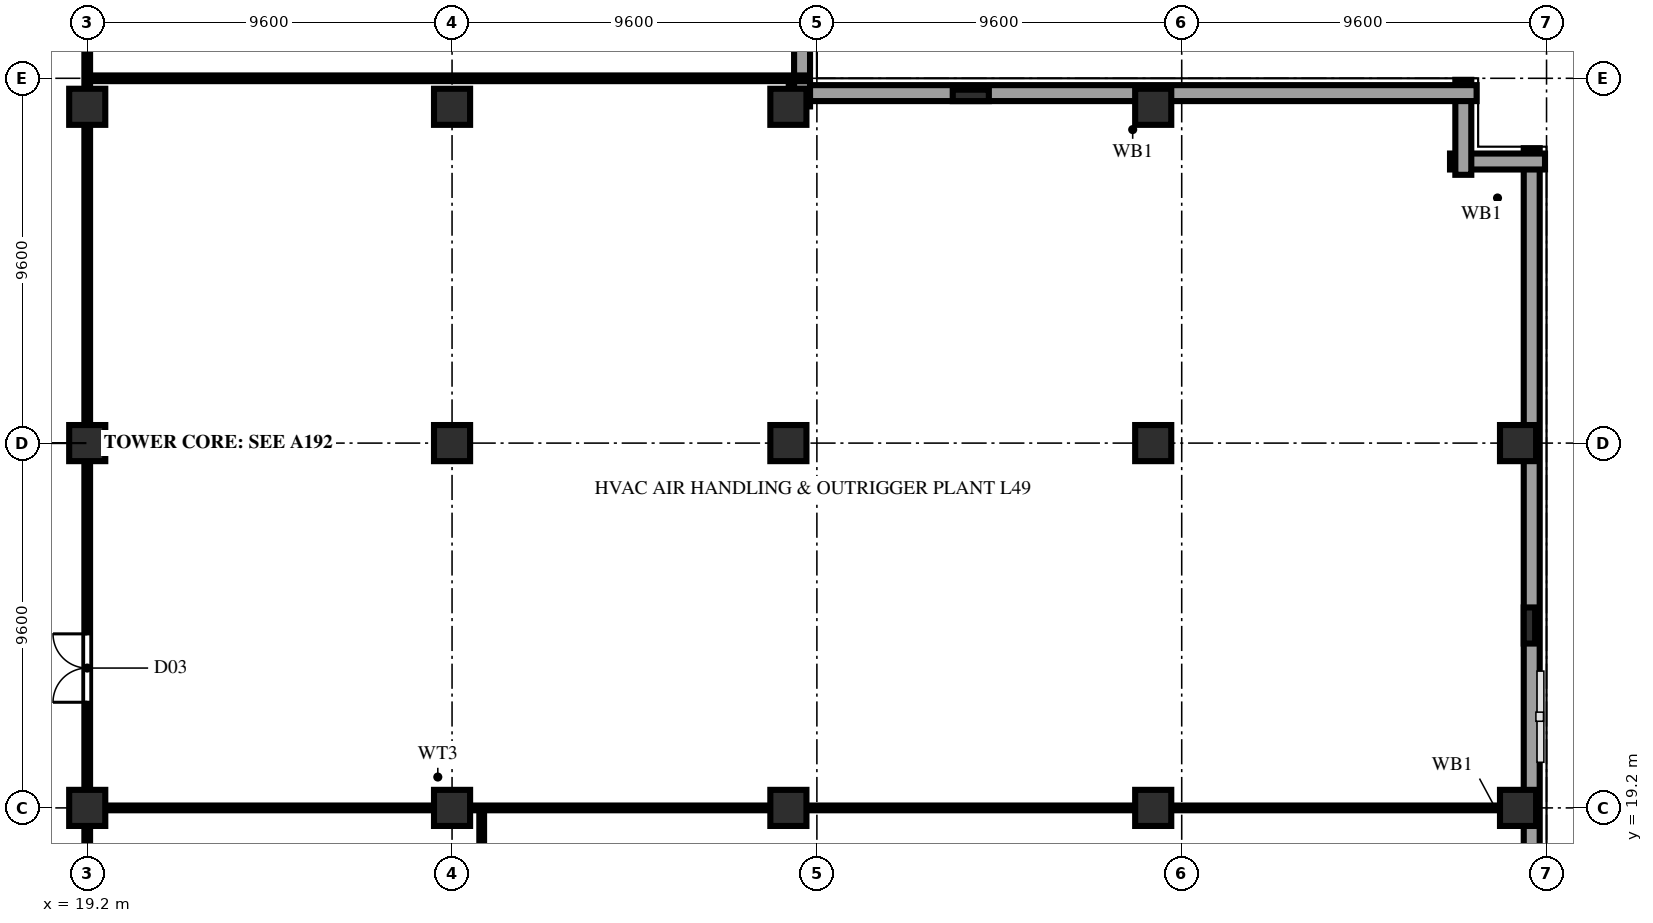
"""IFC4 building model, lengths in metres.
Left out: names, types, materials, properties, quantities, classifications, styles, units other than length and angle.
Written with IfcOpenShell. Run it as: python <this file> out.ifc"""

import sys

from ifc_helpers import new_model, si_unit, direction, frame, frame_2d, origin, origin_2d, place, context, subcontext, project, spatial, rectangle, extrude, element, fill, save


model = new_model("IFC4")
c1 = context("Model", 3, precision=1e-05, world=origin(), true_north=direction((0.0, 1.0)))
c2 = subcontext(c1, "Body", "Model", "MODEL_VIEW")
j1 = project(units=[si_unit("LENGTHUNIT", "METRE"), si_unit("PLANEANGLEUNIT", "RADIAN")], contexts=[c1])
p1 = place(None, origin())
s1 = spatial("IfcSite", under=j1, at=p1, CompositionType="ELEMENT")
p2 = place(p1, origin())
s2 = spatial("IfcBuilding", under=s1, at=p2, CompositionType="ELEMENT")
p3 = place(p2, frame((0.0, 0.0, 194.0)))
s3 = spatial("IfcBuildingStorey", under=s2, at=p3, CompositionType="ELEMENT", Elevation=194.0)
for number, where, z_axis, x_axis in (
    (1, (19.2, 19.2, 0.0), (0.0, 0.0, 1.0), (1.0, 0.0, 0.0)),
    (2, (19.2, 28.8, 0.0), (0.0, 0.0, 1.0), (1.0, 0.0, 0.0)),
    (3, (19.2, 37.65, 0.0), (0.0, 0.0, 1.0), (1.0, 0.0, 0.0)),
    (4, (28.8, 19.2, 0.0), (0.0, 0.0, 1.0), (1.0, 0.0, 0.0)),
    (5, (28.8, 28.8, 0.0), (0.0, 0.0, 1.0), (1.0, 0.0, 0.0)),
    (6, (28.8, 37.65, 0.0), (0.0, 0.0, 1.0), (1.0, 0.0, 0.0)),
    (7, (37.65, 19.2, 0.0), (0.0, 0.0, 1.0), (1.0, 0.0, 0.0)),
    (8, (37.65, 28.8, 0.0), (0.0, 0.0, 1.0), (1.0, 0.0, 0.0)),
    (9, (37.65, 37.65, 0.0), (0.0, 0.0, 1.0), (1.0, 0.0, 0.0)),
    (10, (47.25, 19.2, 0.0), (0.0, 0.0, 1.0), (1.0, 0.0, 0.0)),
    (11, (47.25, 28.8, 0.0), (0.0, 0.0, 1.0), (1.0, 0.0, 0.0)),
    (12, (47.25, 37.65, 0.0), (0.0, 0.0, 1.0), (1.0, 0.0, 0.0)),
    (13, (56.85, 19.2, 0.0), (0.0, 0.0, 1.0), (1.0, 0.0, 0.0)),
    (14, (56.85, 28.8, 0.0), (0.0, 0.0, 1.0), (1.0, 0.0, 0.0)),
):
    element("IfcColumn", number, at=place(p3, frame(where, z_axis=z_axis, x_axis=x_axis)), inside=s3, PredefinedType="COLUMN", context=c2, shape_type="SweptSolid", body=[
        extrude(rectangle(XDim=0.95, YDim=0.95, at=origin_2d()), origin(), (0.0, 0.0, 1.0), 5.0),
    ])
for number, where, z_axis, x_axis in (
    (15, (57.15, 24.0, 0.0), (0.0, 0.0, 1.0), (0.0, 1.0, 0.0)),
    (16, (42.45, 37.95, 0.0), (0.0, 0.0, 1.0), (1.0, 0.0, 0.0)),
):
    element("IfcColumn", number, at=place(p3, frame(where, z_axis=z_axis, x_axis=x_axis)), inside=s3, PredefinedType="PILASTER", context=c2, shape_type="SweptSolid", body=[
        extrude(rectangle(XDim=0.95, YDim=0.3, at=origin_2d()), origin(), (0.0, 0.0, 1.0), 5.0),
    ])
p4 = place(p3, frame((57.21, 1.84, 0.0), z_axis=(0.0, 0.0, 1.0), x_axis=(0.0, 1.0, 0.0)))
e17 = element("IfcWall", 17, at=p4, inside=s3, PredefinedType="SOLIDWALL", context=c2, shape_type="SweptSolid", body=[
    extrude(rectangle(XDim=34.72, YDim=0.42, at=frame_2d((17.36, 0.0))), origin(), (0.0, 0.0, 1.0), 4.74),
])
for number, where, z_axis, x_axis in (
    (18, (57.56, 36.21, 0.0), (0.0, 0.0, 1.0), (-1.0, 0.0, 0.0)),
    (19, (55.41, 35.86, 0.0), (0.0, 0.0, 1.0), (0.0, 1.0, 0.0)),
):
    element("IfcWall", number, at=place(p3, frame(where, z_axis=z_axis, x_axis=x_axis)), inside=s3, PredefinedType="SOLIDWALL", context=c2, shape_type="SweptSolid", body=[
        extrude(rectangle(XDim=2.5, YDim=0.42, at=frame_2d((1.25, 0.0))), origin(), (0.0, 0.0, 1.0), 4.74),
    ])
p5 = place(p3, frame((55.76, 38.01, 0.0), z_axis=(0.0, 0.0, 1.0), x_axis=(-1.0, 0.0, 0.0)))
e20 = element("IfcWall", 20, at=p5, inside=s3, PredefinedType="SOLIDWALL", context=c2, shape_type="SweptSolid", body=[
    extrude(rectangle(XDim=18.1, YDim=0.42, at=frame_2d((9.05, 0.0))), origin(), (0.0, 0.0, 1.0), 4.74),
])
p6 = place(p3, frame((38.01, 37.66, 0.0), z_axis=(0.0, 0.0, 1.0), x_axis=(0.0, 1.0, 0.0)))
e21 = element("IfcWall", 21, at=p6, inside=s3, PredefinedType="SOLIDWALL", context=c2, shape_type="SweptSolid", body=[
    extrude(rectangle(XDim=27.7, YDim=0.42, at=frame_2d((13.85, 0.0))), origin(), (0.0, 0.0, 1.0), 4.74),
])
p7 = place(p3, frame((29.58, 17.95, 0.0), z_axis=(0.0, 0.0, 1.0), x_axis=(0.0, 1.0, 0.0)))
e22 = element("IfcWall", 22, at=p7, inside=s3, PredefinedType="PARTITIONING", context=c2, shape_type="SweptSolid", body=[
    extrude(rectangle(XDim=1.25, YDim=0.125, at=frame_2d((0.625, 0.0))), origin(), (0.0, 0.0, 1.0), 4.74),
])
p8 = place(p3, frame((19.2, 19.2, 0.0), z_axis=(0.0, 0.0, 1.0), x_axis=(1.0, 0.0, 0.0)))
e23 = element("IfcWall", 23, at=p8, inside=s3, PredefinedType="PARTITIONING", context=c2, shape_type="SweptSolid", body=[
    extrude(rectangle(XDim=18.45, YDim=0.125, at=frame_2d((9.225, 0.0))), origin(), (0.0, 0.0, 1.0), 2.323),
])
p9 = place(p3, frame((37.65, 19.2, 0.0), z_axis=(0.0, 0.0, 1.0), x_axis=(1.0, 0.0, 0.0)))
e24 = element("IfcWall", 24, at=p9, inside=s3, PredefinedType="PARTITIONING", context=c2, shape_type="SweptSolid", body=[
    extrude(rectangle(XDim=19.2, YDim=0.125, at=frame_2d((9.6, 0.0))), origin(), (0.0, 0.0, 1.0), 3.967),
])
p10 = place(p3, frame((56.85, 19.2, 0.0), z_axis=(0.0, 0.0, 1.0), x_axis=(1.0, 0.0, 0.0)))
e25 = element("IfcWall", 25, at=p10, inside=s3, PredefinedType="PARTITIONING", context=c2, shape_type="SweptSolid", body=[
    extrude(rectangle(XDim=0.53, YDim=0.125, at=frame_2d((0.265, 0.0))), origin(), (0.0, 0.0, 1.0), 4.74),
])
p11 = place(p3, frame((19.2, 38.4, 0.0), z_axis=(0.0, 0.0, 1.0), x_axis=(1.0, 0.0, 0.0)))
e26 = element("IfcWall", 26, at=p11, inside=s3, PredefinedType="PARTITIONING", context=c2, shape_type="SweptSolid", body=[
    extrude(rectangle(XDim=18.98, YDim=0.15, at=frame_2d((9.49, 0.0))), origin(), (0.0, 0.0, 1.0), 4.74),
])
p12 = place(p3, frame((19.2, 9.98, 0.0), z_axis=(0.0, 0.0, 1.0), x_axis=(0.0, 1.0, 0.0)))
e27 = element("IfcWall", 27, at=p12, inside=s3, PredefinedType="PARTITIONING", context=c2, shape_type="SweptSolid", body=[
    extrude(rectangle(XDim=46.87, YDim=0.15, at=frame_2d((23.435, 0.0))), origin(), (0.0, 0.0, 1.0), 3.967),
])
p13 = place(p12, frame((2.0, 0.0, 0.0)))
e28 = element("IfcOpeningElement", 28, at=p13, cuts=e27, PredefinedType="OPENING", context=c2, shape_type="SweptSolid", body=[
    extrude(rectangle(XDim=1.8, YDim=2.2, at=frame_2d((0.9, 1.1))), frame((0.0, 0.087, 0.0), z_axis=(0.0, -1.0, 0.0), x_axis=(1.0, 0.0, 0.0)), (0.0, 0.0, 1.0), 0.174),
])
p14 = place(p12, frame((12.0, 0.0, 0.0)))
e29 = element("IfcOpeningElement", 29, at=p14, cuts=e27, PredefinedType="OPENING", context=c2, shape_type="SweptSolid", body=[
    extrude(rectangle(XDim=1.8, YDim=2.2, at=frame_2d((0.9, 1.1))), frame((0.0, 0.087, 0.0), z_axis=(0.0, -1.0, 0.0), x_axis=(1.0, 0.0, 0.0)), (0.0, 0.0, 1.0), 0.174),
])
p15 = place(p12, frame((30.5, 0.0, 0.0)))
e30 = element("IfcOpeningElement", 30, at=p15, cuts=e27, PredefinedType="OPENING", context=c2, shape_type="SweptSolid", body=[
    extrude(rectangle(XDim=1.2, YDim=2.2, at=frame_2d((0.6, 1.1))), frame((0.0, 0.087, 0.0), z_axis=(0.0, -1.0, 0.0), x_axis=(1.0, 0.0, 0.0)), (0.0, 0.0, 1.0), 0.174),
])
p16 = place(p12, frame((40.5, 0.0, 0.0)))
e31 = element("IfcOpeningElement", 31, at=p16, cuts=e27, PredefinedType="OPENING", context=c2, shape_type="SweptSolid", body=[
    extrude(rectangle(XDim=1.8, YDim=2.2, at=frame_2d((0.9, 1.1))), frame((0.0, 0.087, 0.0), z_axis=(0.0, -1.0, 0.0), x_axis=(1.0, 0.0, 0.0)), (0.0, 0.0, 1.0), 0.174),
])
p17 = place(p14, origin())
e32 = element("IfcDoor", 32, at=p17, inside=s3, OperationType="DOUBLE_DOOR_SINGLE_SWING", PredefinedType="DOOR", context=c2, shape_type="SweptSolid", body=[
    extrude(rectangle(XDim=1.8, YDim=2.2, at=frame_2d((0.9, 1.1))), frame((0.0, 0.025, 0.0), z_axis=(0.0, -1.0, 0.0), x_axis=(1.0, 0.0, 0.0)), (0.0, 0.0, 1.0), 0.05),
])
fill(e29, e32)
save(model, sys.argv[1])
